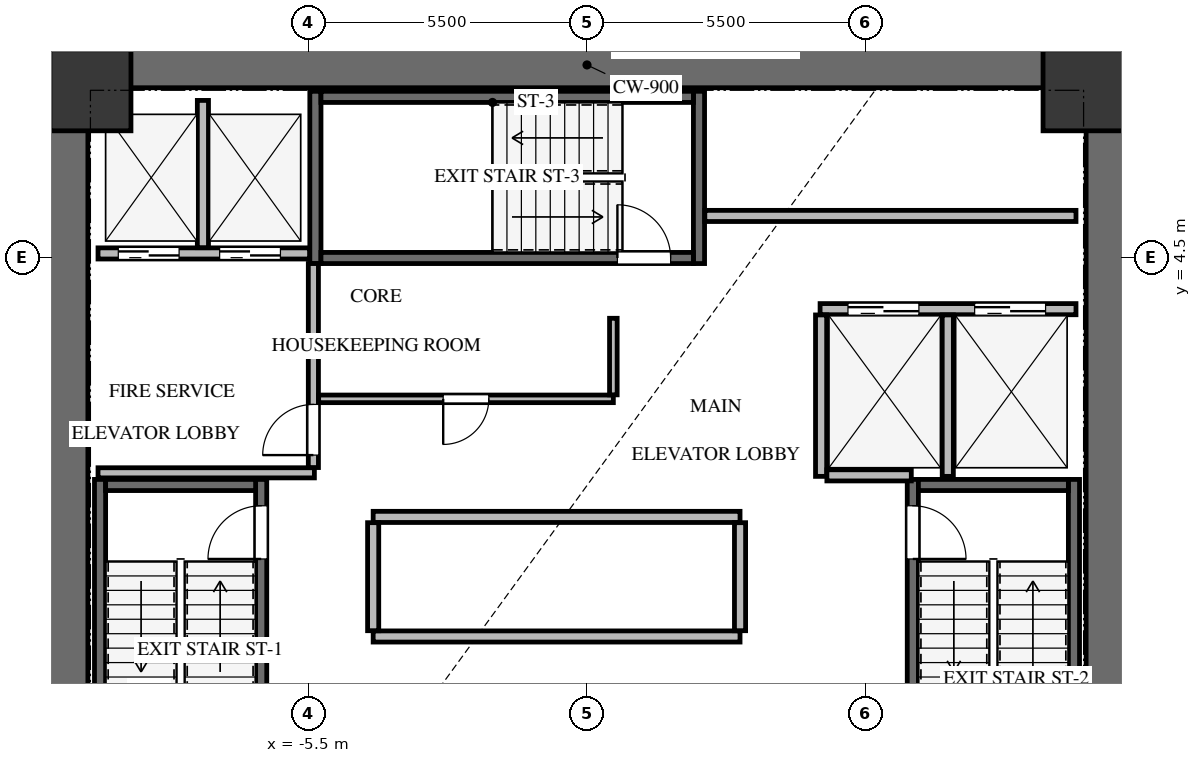
"""IFC4 building model, lengths in metres.
Left out: names, types, materials, properties, quantities, classifications, styles, units other than length and angle.
Written with IfcOpenShell. Run it as: python <this file> out.ifc"""

import sys

from ifc_helpers import new_model, si_unit, direction, frame, frame_2d, origin, origin_2d, place, context, subcontext, project, spatial, rectangle, extrude, source, transform, mapped, element, fill, save


model = new_model("IFC4")
c1 = context("Model", 3, precision=1e-05, world=origin(), true_north=direction((0.0, 1.0)))
c2 = subcontext(c1, "Body", "Model", "MODEL_VIEW")
j1 = project(units=[si_unit("LENGTHUNIT", "METRE"), si_unit("PLANEANGLEUNIT", "RADIAN")], contexts=[c1])
p1 = place(None, origin())
s1 = spatial("IfcSite", under=j1, at=p1, CompositionType="ELEMENT")
p2 = place(p1, origin())
s2 = spatial("IfcBuilding", under=s1, at=p2, CompositionType="ELEMENT")
p3 = place(p2, frame((0.0, 0.0, 32.4)))
s3 = spatial("IfcBuildingStorey", under=s2, at=p3, CompositionType="ELEMENT", Elevation=32.4)
for number, where, z_axis, x_axis in (
    (1, (-10.3, -8.75, 0.0), (0.0, 0.0, 1.0), (0.0, 1.0, 0.0)),
    (2, (10.3, -8.75, 0.0), (0.0, 0.0, 1.0), (0.0, 1.0, 0.0)),
):
    element("IfcWall", number, at=place(p3, frame(where, z_axis=z_axis, x_axis=x_axis)), inside=s3, PredefinedType="SHEAR", context=c2, shape_type="SweptSolid", body=[
        extrude(rectangle(XDim=17.5, YDim=0.9, at=frame_2d((8.75, 0.0))), origin(), (0.0, 0.0, 1.0), 3.3),
    ])
p4 = place(p3, frame((-9.85, 8.3, 0.0), z_axis=(0.0, 0.0, 1.0), x_axis=(1.0, 0.0, 0.0)))
e3 = element("IfcWall", 3, at=p4, inside=s3, PredefinedType="SHEAR", context=c2, shape_type="SweptSolid", body=[
    extrude(rectangle(XDim=19.7, YDim=0.9, at=frame_2d((9.85, 0.0))), origin(), (0.0, 0.0, 1.0), 3.3),
])
p5 = place(p3, frame((-6.43, -7.77, -0.24), z_axis=(0.0, 0.0, 1.0), x_axis=(0.0, 1.0, 0.0)))
e4 = element("IfcWall", 4, at=p5, inside=s3, PredefinedType="SHEAR", context=c2, shape_type="SweptSolid", body=[
    extrude(rectangle(XDim=7.89, YDim=0.22, at=frame_2d((3.945, 0.0))), origin(), (0.0, 0.0, 1.0), 3.3),
])
p6 = place(p5, frame((6.32, 0.0, 0.0)))
e5 = element("IfcOpeningElement", 5, at=p6, cuts=e4, PredefinedType="OPENING", context=c2, shape_type="SweptSolid", body=[
    extrude(rectangle(XDim=1.05, YDim=2.15, at=frame_2d((0.525, 1.075))), frame((0.0, 0.12, 0.0), z_axis=(0.0, -1.0, 0.0), x_axis=(1.0, 0.0, 0.0)), (0.0, 0.0, 1.0), 0.24),
])
p7 = place(p3, frame((-9.61, 0.12, -0.24), z_axis=(0.0, 0.0, 1.0), x_axis=(0.0, -1.0, 0.0)))
e6 = element("IfcWall", 6, at=p7, inside=s3, PredefinedType="SHEAR", context=c2, shape_type="SweptSolid", body=[
    extrude(rectangle(XDim=7.89, YDim=0.22, at=frame_2d((3.945, 0.0))), origin(), (0.0, 0.0, 1.0), 3.3),
])
p8 = place(p3, frame((-6.54, 0.01, -0.24), z_axis=(0.0, 0.0, 1.0), x_axis=(-1.0, 0.0, 0.0)))
e7 = element("IfcWall", 7, at=p8, inside=s3, PredefinedType="SHEAR", context=c2, shape_type="SweptSolid", body=[
    extrude(rectangle(XDim=2.96, YDim=0.22, at=frame_2d((1.48, 0.0))), origin(), (0.0, 0.0, 1.0), 3.3),
])
p9 = place(p3, frame((9.61, -7.77, -0.24), z_axis=(0.0, 0.0, 1.0), x_axis=(0.0, 1.0, 0.0)))
e8 = element("IfcWall", 8, at=p9, inside=s3, PredefinedType="SHEAR", context=c2, shape_type="SweptSolid", body=[
    extrude(rectangle(XDim=7.89, YDim=0.22, at=frame_2d((3.945, 0.0))), origin(), (0.0, 0.0, 1.0), 3.3),
])
p10 = place(p3, frame((6.43, 0.12, -0.24), z_axis=(0.0, 0.0, 1.0), x_axis=(0.0, -1.0, 0.0)))
e9 = element("IfcWall", 9, at=p10, inside=s3, PredefinedType="SHEAR", context=c2, shape_type="SweptSolid", body=[
    extrude(rectangle(XDim=7.89, YDim=0.22, at=frame_2d((3.945, 0.0))), origin(), (0.0, 0.0, 1.0), 3.3),
])
p11 = place(p10, frame((0.52, 0.0, 0.0)))
e10 = element("IfcOpeningElement", 10, at=p11, cuts=e9, PredefinedType="OPENING", context=c2, shape_type="SweptSolid", body=[
    extrude(rectangle(XDim=1.05, YDim=2.15, at=frame_2d((0.525, 1.075))), frame((0.0, 0.12, 0.0), z_axis=(0.0, -1.0, 0.0), x_axis=(1.0, 0.0, 0.0)), (0.0, 0.0, 1.0), 0.24),
])
p12 = place(p3, frame((9.5, 0.01, -0.24), z_axis=(0.0, 0.0, 1.0), x_axis=(-1.0, 0.0, 0.0)))
e11 = element("IfcWall", 11, at=p12, inside=s3, PredefinedType="SHEAR", context=c2, shape_type="SweptSolid", body=[
    extrude(rectangle(XDim=2.96, YDim=0.22, at=frame_2d((1.48, 0.0))), origin(), (0.0, 0.0, 1.0), 3.3),
])
for number, where, z_axis, x_axis in (
    (12, (2.21, 4.38, -0.24), (0.0, 0.0, 1.0), (0.0, 1.0, 0.0)),
    (13, (-5.36, 7.78, -0.24), (0.0, 0.0, 1.0), (0.0, -1.0, 0.0)),
):
    element("IfcWall", number, at=place(p3, frame(where, z_axis=z_axis, x_axis=x_axis)), inside=s3, PredefinedType="SHEAR", context=c2, shape_type="SweptSolid", body=[
        extrude(rectangle(XDim=3.4, YDim=0.22, at=frame_2d((1.7, 0.0))), origin(), (0.0, 0.0, 1.0), 3.3),
    ])
p13 = place(p3, frame((-5.25, 4.49, -0.24), z_axis=(0.0, 0.0, 1.0), x_axis=(1.0, 0.0, 0.0)))
e14 = element("IfcWall", 14, at=p13, inside=s3, PredefinedType="SHEAR", context=c2, shape_type="SweptSolid", body=[
    extrude(rectangle(XDim=7.35, YDim=0.22, at=frame_2d((3.675, 0.0))), origin(), (0.0, 0.0, 1.0), 3.3),
])
p14 = place(p13, frame((5.85, 0.0, 0.0)))
e15 = element("IfcOpeningElement", 15, at=p14, cuts=e14, PredefinedType="OPENING", context=c2, shape_type="SweptSolid", body=[
    extrude(rectangle(XDim=1.05, YDim=2.15, at=frame_2d((0.525, 1.075))), frame((0.0, 0.12, 0.0), z_axis=(0.0, -1.0, 0.0), x_axis=(1.0, 0.0, 0.0)), (0.0, 0.0, 1.0), 0.24),
])
p15 = place(p3, frame((2.1, 7.67, -0.24), z_axis=(0.0, 0.0, 1.0), x_axis=(-1.0, 0.0, 0.0)))
e16 = element("IfcWall", 16, at=p15, inside=s3, PredefinedType="SHEAR", context=c2, shape_type="SweptSolid", body=[
    extrude(rectangle(XDim=7.35, YDim=0.22, at=frame_2d((3.675, 0.0))), origin(), (0.0, 0.0, 1.0), 3.3),
])
m1 = source(origin(), c2, "Body", "SweptSolid", [
    extrude(rectangle(XDim=1.6, YDim=1.6, at=origin_2d()), origin(), (0.0, 0.0, 1.0), 3.3),
])
for number, where, z_axis, x_axis in (
    (17, (9.8, 7.8, -0.24), (0.0, 0.0, 1.0), (1.0, 0.0, 0.0)),
    (18, (-9.8, 7.8, -0.24), (0.0, 0.0, 1.0), (1.0, 0.0, 0.0)),
):
    element("IfcColumn", number, at=place(p3, frame(where, z_axis=z_axis, x_axis=x_axis)), inside=s3, PredefinedType="COLUMN", context=c2, shape_type="MappedRepresentation", body=[
        mapped(m1, transform((0.0, 0.0, 0.0), x_axis=(1.0, 0.0, 0.0), y_axis=(0.0, 1.0, 0.0), z_axis=(0.0, 0.0, 1.0), scale=1.0)),
    ])
p16 = place(p3, frame((-9.65, 4.58, 0.0), z_axis=(0.0, 0.0, 1.0), x_axis=(1.0, 0.0, 0.0)))
e19 = element("IfcWall", 19, at=p16, inside=s3, PredefinedType="SOLIDWALL", context=c2, shape_type="SweptSolid", body=[
    extrude(rectangle(XDim=4.175, YDim=0.22, at=frame_2d((2.087, 0.0))), origin(), (0.0, 0.0, 1.0), 3.045),
])
p17 = place(p16, frame((0.4, 0.0, 0.0)))
e20 = element("IfcOpeningElement", 20, at=p17, cuts=e19, PredefinedType="OPENING", context=c2, shape_type="SweptSolid", body=[
    extrude(rectangle(XDim=1.2, YDim=2.15, at=frame_2d((0.6, 1.075))), frame((0.0, 0.12, 0.0), z_axis=(0.0, -1.0, 0.0), x_axis=(1.0, 0.0, 0.0)), (0.0, 0.0, 1.0), 0.24),
])
p18 = place(p16, frame((2.4, 0.0, 0.0)))
e21 = element("IfcOpeningElement", 21, at=p18, cuts=e19, PredefinedType="OPENING", context=c2, shape_type="SweptSolid", body=[
    extrude(rectangle(XDim=1.2, YDim=2.15, at=frame_2d((0.6, 1.075))), frame((0.0, 0.12, 0.0), z_axis=(0.0, -1.0, 0.0), x_axis=(1.0, 0.0, 0.0)), (0.0, 0.0, 1.0), 0.24),
])
p19 = place(p3, frame((-7.58, 4.694, 0.0), z_axis=(0.0, 0.0, 1.0), x_axis=(0.0, 1.0, 0.0)))
e22 = element("IfcWall", 22, at=p19, inside=s3, PredefinedType="SOLIDWALL", context=c2, shape_type="SweptSolid", body=[
    extrude(rectangle(XDim=2.906, YDim=0.22, at=frame_2d((1.453, 0.0))), origin(), (0.0, 0.0, 1.0), 3.045),
])
p20 = place(p3, frame((-9.65, 0.25, 0.0), z_axis=(0.0, 0.0, 1.0), x_axis=(1.0, 0.0, 0.0)))
e23 = element("IfcWall", 23, at=p20, inside=s3, PredefinedType="SOLIDWALL", context=c2, shape_type="SweptSolid", body=[
    extrude(rectangle(XDim=4.27, YDim=0.2, at=frame_2d((2.135, 0.0))), origin(), (0.0, 0.0, 1.0), 3.045),
])
p21 = place(p3, frame((-5.4, 0.354, 0.0), z_axis=(0.0, 0.0, 1.0), x_axis=(0.0, 1.0, 0.0)))
e24 = element("IfcWall", 24, at=p21, inside=s3, PredefinedType="SOLIDWALL", context=c2, shape_type="SweptSolid", body=[
    extrude(rectangle(XDim=4.026, YDim=0.2, at=frame_2d((2.013, 0.0))), origin(), (0.0, 0.0, 1.0), 3.045),
])
p22 = place(p21, frame((0.246, 0.0, 0.0)))
e25 = element("IfcOpeningElement", 25, at=p22, cuts=e24, PredefinedType="OPENING", context=c2, shape_type="SweptSolid", body=[
    extrude(rectangle(XDim=1.0, YDim=2.15, at=frame_2d((0.5, 1.075))), frame((0.0, 0.11, 0.0), z_axis=(0.0, -1.0, 0.0), x_axis=(1.0, 0.0, 0.0)), (0.0, 0.0, 1.0), 0.22),
])
p23 = place(p3, frame((4.6, 3.48, 0.0), z_axis=(0.0, 0.0, 1.0), x_axis=(1.0, 0.0, 0.0)))
e26 = element("IfcWall", 26, at=p23, inside=s3, PredefinedType="SOLIDWALL", context=c2, shape_type="SweptSolid", body=[
    extrude(rectangle(XDim=5.05, YDim=0.22, at=frame_2d((2.525, 0.0))), origin(), (0.0, 0.0, 1.0), 3.045),
])
p24 = place(p23, frame((0.55, 0.0, 0.0)))
e27 = element("IfcOpeningElement", 27, at=p24, cuts=e26, PredefinedType="OPENING", context=c2, shape_type="SweptSolid", body=[
    extrude(rectangle(XDim=1.4, YDim=2.15, at=frame_2d((0.7, 1.075))), frame((0.0, 0.12, 0.0), z_axis=(0.0, -1.0, 0.0), x_axis=(1.0, 0.0, 0.0)), (0.0, 0.0, 1.0), 0.24),
])
p25 = place(p23, frame((3.05, 0.0, 0.0)))
e28 = element("IfcOpeningElement", 28, at=p25, cuts=e26, PredefinedType="OPENING", context=c2, shape_type="SweptSolid", body=[
    extrude(rectangle(XDim=1.4, YDim=2.15, at=frame_2d((0.7, 1.075))), frame((0.0, 0.12, 0.0), z_axis=(0.0, -1.0, 0.0), x_axis=(1.0, 0.0, 0.0)), (0.0, 0.0, 1.0), 0.24),
])
for number, where, z_axis, x_axis in (
    (29, (4.62, 0.18, 0.0), (0.0, 0.0, 1.0), (0.0, 1.0, 0.0)),
    (30, (7.12, 0.18, 0.0), (0.0, 0.0, 1.0), (0.0, 1.0, 0.0)),
):
    element("IfcWall", number, at=place(p3, frame(where, z_axis=z_axis, x_axis=x_axis)), inside=s3, PredefinedType="SOLIDWALL", context=c2, shape_type="SweptSolid", body=[
        extrude(rectangle(XDim=3.186, YDim=0.22, at=frame_2d((1.593, 0.0))), origin(), (0.0, 0.0, 1.0), 3.045),
    ])
p26 = place(p3, frame((4.734, 0.2, 0.0), z_axis=(0.0, 0.0, 1.0), x_axis=(1.0, 0.0, 0.0)))
e31 = element("IfcWall", 31, at=p26, inside=s3, PredefinedType="SOLIDWALL", context=c2, shape_type="SweptSolid", body=[
    extrude(rectangle(XDim=1.666, YDim=0.22, at=frame_2d((0.833, 0.0))), origin(), (0.0, 0.0, 1.0), 3.045),
])
for number, where, z_axis, x_axis in (
    (32, (-4.22, -2.98, 0.0), (0.0, 0.0, 1.0), (1.0, 0.0, 0.0)),
    (33, (-4.22, -0.62, 0.0), (0.0, 0.0, 1.0), (1.0, 0.0, 0.0)),
):
    element("IfcWall", number, at=place(p3, frame(where, z_axis=z_axis, x_axis=x_axis)), inside=s3, PredefinedType="SOLIDWALL", context=c2, shape_type="SweptSolid", body=[
        extrude(rectangle(XDim=7.24, YDim=0.22, at=frame_2d((3.62, 0.0))), origin(), (0.0, 0.0, 1.0), 3.045),
    ])
for number, where, z_axis, x_axis in (
    (34, (-4.22, -2.866, 0.0), (0.0, 0.0, 1.0), (0.0, 1.0, 0.0)),
    (35, (3.02, -2.866, 0.0), (0.0, 0.0, 1.0), (0.0, 1.0, 0.0)),
):
    element("IfcWall", number, at=place(p3, frame(where, z_axis=z_axis, x_axis=x_axis)), inside=s3, PredefinedType="SOLIDWALL", context=c2, shape_type="SweptSolid", body=[
        extrude(rectangle(XDim=2.132, YDim=0.22, at=frame_2d((1.066, 0.0))), origin(), (0.0, 0.0, 1.0), 3.045),
    ])
p27 = place(p3, frame((2.325, 5.32, 0.0), z_axis=(0.0, 0.0, 1.0), x_axis=(1.0, 0.0, 0.0)))
e36 = element("IfcWall", 36, at=p27, inside=s3, PredefinedType="SOLIDWALL", context=c2, shape_type="SweptSolid", body=[
    extrude(rectangle(XDim=7.325, YDim=0.22, at=frame_2d((3.663, 0.0))), origin(), (0.0, 0.0, 1.0), 3.045),
])
p28 = place(p3, frame((0.52, 1.71, 0.0), z_axis=(0.0, 0.0, 1.0), x_axis=(-1.0, 0.0, 0.0)))
e37 = element("IfcWall", 37, at=p28, inside=s3, PredefinedType="PARTITIONING", context=c2, shape_type="SweptSolid", body=[
    extrude(rectangle(XDim=5.816, YDim=0.15, at=frame_2d((2.908, 0.0))), origin(), (0.0, 0.0, 1.0), 3.045),
])
p29 = place(p28, frame((2.458, 0.0, 0.0)))
e38 = element("IfcOpeningElement", 38, at=p29, cuts=e37, PredefinedType="OPENING", context=c2, shape_type="SweptSolid", body=[
    extrude(rectangle(XDim=0.9, YDim=2.05, at=frame_2d((0.45, 1.025))), frame((0.0, 0.085, 0.0), z_axis=(0.0, -1.0, 0.0), x_axis=(1.0, 0.0, 0.0)), (0.0, 0.0, 1.0), 0.17),
])
p30 = place(p3, frame((0.52, 3.3, 0.0), z_axis=(0.0, 0.0, 1.0), x_axis=(0.0, -1.0, 0.0)))
e39 = element("IfcWall", 39, at=p30, inside=s3, PredefinedType="PARTITIONING", context=c2, shape_type="SweptSolid", body=[
    extrude(rectangle(XDim=1.511, YDim=0.15, at=frame_2d((0.755, 0.0))), origin(), (0.0, 0.0, 1.0), 3.045),
])
m2 = source(origin(), c2, "Body", "SweptSolid", [
    extrude(rectangle(XDim=1.05, YDim=2.15, at=frame_2d((0.525, 1.075))), frame((0.0, 0.025, 0.0), z_axis=(0.0, -1.0, 0.0), x_axis=(1.0, 0.0, 0.0)), (0.0, 0.0, 1.0), 0.05),
])
p31 = place(p6, origin())
e40 = element("IfcDoor", 40, at=p31, inside=s3, OperationType="SINGLE_SWING_LEFT", PredefinedType="DOOR", context=c2, shape_type="MappedRepresentation", body=[
    mapped(m2, transform((0.0, 0.0, 0.0), x_axis=(1.0, 0.0, 0.0), y_axis=(0.0, 1.0, 0.0), z_axis=(0.0, 0.0, 1.0), scale=1.0)),
])
fill(e5, e40)
m3 = source(origin(), c2, "Body", "SweptSolid", [
    extrude(rectangle(XDim=1.05, YDim=2.15, at=frame_2d((0.525, 1.075))), frame((0.0, 0.025, 0.0), z_axis=(0.0, -1.0, 0.0), x_axis=(1.0, 0.0, 0.0)), (0.0, 0.0, 1.0), 0.05),
])
p32 = place(p11, origin())
e41 = element("IfcDoor", 41, at=p32, inside=s3, OperationType="SINGLE_SWING_RIGHT", PredefinedType="DOOR", context=c2, shape_type="MappedRepresentation", body=[
    mapped(m3, transform((0.0, 0.0, 0.0), x_axis=(1.0, 0.0, 0.0), y_axis=(0.0, 1.0, 0.0), z_axis=(0.0, 0.0, 1.0), scale=1.0)),
])
fill(e10, e41)
p33 = place(p14, origin())
e42 = element("IfcDoor", 42, at=p33, inside=s3, OperationType="SINGLE_SWING_LEFT", PredefinedType="DOOR", context=c2, shape_type="MappedRepresentation", body=[
    mapped(m2, transform((0.0, 0.0, 0.0), x_axis=(1.0, 0.0, 0.0), y_axis=(0.0, 1.0, 0.0), z_axis=(0.0, 0.0, 1.0), scale=1.0)),
])
fill(e15, e42)
m4 = source(origin(), c2, "Body", "SweptSolid", [
    extrude(rectangle(XDim=1.2, YDim=2.15, at=frame_2d((0.6, 1.075))), frame((0.0, 0.025, 0.0), z_axis=(0.0, -1.0, 0.0), x_axis=(1.0, 0.0, 0.0)), (0.0, 0.0, 1.0), 0.05),
])
p34 = place(p17, origin())
e43 = element("IfcDoor", 43, at=p34, inside=s3, OperationType="DOUBLE_DOOR_SLIDING", PredefinedType="DOOR", context=c2, shape_type="MappedRepresentation", body=[
    mapped(m4, transform((0.0, 0.0, 0.0), x_axis=(1.0, 0.0, 0.0), y_axis=(0.0, 1.0, 0.0), z_axis=(0.0, 0.0, 1.0), scale=1.0)),
])
fill(e20, e43)
p35 = place(p18, origin())
e44 = element("IfcDoor", 44, at=p35, inside=s3, OperationType="DOUBLE_DOOR_SLIDING", PredefinedType="DOOR", context=c2, shape_type="MappedRepresentation", body=[
    mapped(m4, transform((0.0, 0.0, 0.0), x_axis=(1.0, 0.0, 0.0), y_axis=(0.0, 1.0, 0.0), z_axis=(0.0, 0.0, 1.0), scale=1.0)),
])
fill(e21, e44)
m5 = source(origin(), c2, "Body", "SweptSolid", [
    extrude(rectangle(XDim=1.0, YDim=2.15, at=frame_2d((0.5, 1.075))), frame((0.0, 0.025, 0.0), z_axis=(0.0, -1.0, 0.0), x_axis=(1.0, 0.0, 0.0)), (0.0, 0.0, 1.0), 0.05),
])
p36 = place(p22, origin())
e45 = element("IfcDoor", 45, at=p36, inside=s3, OperationType="SINGLE_SWING_LEFT", PredefinedType="DOOR", context=c2, shape_type="MappedRepresentation", body=[
    mapped(m5, transform((0.0, 0.0, 0.0), x_axis=(1.0, 0.0, 0.0), y_axis=(0.0, 1.0, 0.0), z_axis=(0.0, 0.0, 1.0), scale=1.0)),
])
fill(e25, e45)
m6 = source(origin(), c2, "Body", "SweptSolid", [
    extrude(rectangle(XDim=1.4, YDim=2.15, at=frame_2d((0.7, 1.075))), frame((0.0, 0.025, 0.0), z_axis=(0.0, -1.0, 0.0), x_axis=(1.0, 0.0, 0.0)), (0.0, 0.0, 1.0), 0.05),
])
p37 = place(p24, origin())
e46 = element("IfcDoor", 46, at=p37, inside=s3, OperationType="DOUBLE_DOOR_SLIDING", PredefinedType="DOOR", context=c2, shape_type="MappedRepresentation", body=[
    mapped(m6, transform((0.0, 0.0, 0.0), x_axis=(1.0, 0.0, 0.0), y_axis=(0.0, 1.0, 0.0), z_axis=(0.0, 0.0, 1.0), scale=1.0)),
])
fill(e27, e46)
p38 = place(p25, origin())
e47 = element("IfcDoor", 47, at=p38, inside=s3, OperationType="DOUBLE_DOOR_SLIDING", PredefinedType="DOOR", context=c2, shape_type="MappedRepresentation", body=[
    mapped(m6, transform((0.0, 0.0, 0.0), x_axis=(1.0, 0.0, 0.0), y_axis=(0.0, 1.0, 0.0), z_axis=(0.0, 0.0, 1.0), scale=1.0)),
])
fill(e28, e47)
m7 = source(origin(), c2, "Body", "SweptSolid", [
    extrude(rectangle(XDim=0.9, YDim=2.05, at=frame_2d((0.45, 1.025))), frame((0.0, 0.025, 0.0), z_axis=(0.0, -1.0, 0.0), x_axis=(1.0, 0.0, 0.0)), (0.0, 0.0, 1.0), 0.05),
])
p39 = place(p29, origin())
e48 = element("IfcDoor", 48, at=p39, inside=s3, OperationType="SINGLE_SWING_RIGHT", PredefinedType="DOOR", context=c2, shape_type="MappedRepresentation", body=[
    mapped(m7, transform((0.0, 0.0, 0.0), x_axis=(1.0, 0.0, 0.0), y_axis=(0.0, 1.0, 0.0), z_axis=(0.0, 0.0, 1.0), scale=1.0)),
])
fill(e38, e48)
save(model, sys.argv[1])
